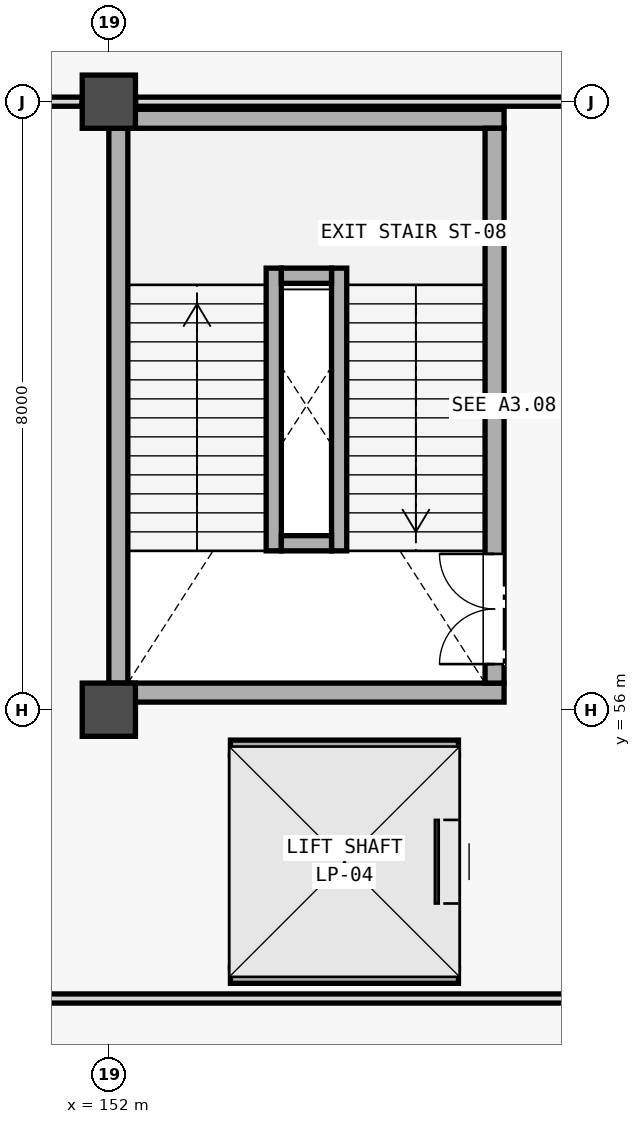
"""IFC4 building model, lengths in metres.
Left out: names, types, materials, properties, quantities, classifications, styles, units other than length and angle.
Written with IfcOpenShell. Run it as: python <this file> out.ifc"""

import sys

from ifc_helpers import new_model, si_unit, direction, frame, frame_2d, origin, origin_2d, place, context, subcontext, project, spatial, rectangle, extrude, element, fill, save


model = new_model("IFC4")
c1 = context("Model", 3, precision=1e-05, world=origin(), true_north=direction((0.0, 1.0)))
c2 = subcontext(c1, "Body", "Model", "MODEL_VIEW")
j1 = project(units=[si_unit("LENGTHUNIT", "METRE"), si_unit("PLANEANGLEUNIT", "RADIAN")], contexts=[c1])
p1 = place(None, origin())
s1 = spatial("IfcSite", under=j1, at=p1, CompositionType="ELEMENT")
p2 = place(p1, origin())
s2 = spatial("IfcBuilding", under=s1, at=p2, CompositionType="ELEMENT")
p3 = place(p2, frame((0.0, 0.0, 5.4)))
s3 = spatial("IfcBuildingStorey", under=s2, at=p3, CompositionType="ELEMENT", Elevation=5.4)
for number, where, z_axis, x_axis in (
    (1, (152.0, 56.0, 0.0), (0.0, 0.0, 1.0), (1.0, 0.0, 0.0)),
    (2, (152.0, 64.0, 0.0), (0.0, 0.0, 1.0), (1.0, 0.0, 0.0)),
):
    element("IfcColumn", number, at=place(p3, frame(where, z_axis=z_axis, x_axis=x_axis)), inside=s3, PredefinedType="COLUMN", context=c2, shape_type="SweptSolid", body=[
        extrude(rectangle(XDim=0.7, YDim=0.7, at=origin_2d()), origin(), (0.0, 0.0, 1.0), 4.55),
    ])
for number, where, z_axis, x_axis in (
    (3, (152.0, 56.225, 0.0), (0.0, 0.0, 1.0), (1.0, 0.0, 0.0)),
    (4, (152.0, 63.775, 0.0), (0.0, 0.0, 1.0), (1.0, 0.0, 0.0)),
):
    element("IfcWall", number, at=place(p3, frame(where, z_axis=z_axis, x_axis=x_axis)), inside=s3, PredefinedType="SHEAR", context=c2, shape_type="SweptSolid", body=[
        extrude(rectangle(XDim=5.2, YDim=0.25, at=frame_2d((2.6, 0.0))), origin(), (0.0, 0.0, 1.0), 4.8),
    ])
p4 = place(p3, frame((152.125, 56.35, 0.0), z_axis=(0.0, 0.0, 1.0), x_axis=(0.0, 1.0, 0.0)))
e5 = element("IfcWall", 5, at=p4, inside=s3, PredefinedType="SHEAR", context=c2, shape_type="SweptSolid", body=[
    extrude(rectangle(XDim=7.3, YDim=0.25, at=frame_2d((3.65, 0.0))), origin(), (0.0, 0.0, 1.0), 4.8),
])
p5 = place(p3, frame((157.075, 56.35, 0.0), z_axis=(0.0, 0.0, 1.0), x_axis=(0.0, 1.0, 0.0)))
e6 = element("IfcWall", 6, at=p5, inside=s3, PredefinedType="SHEAR", context=c2, shape_type="SweptSolid", body=[
    extrude(rectangle(XDim=7.3, YDim=0.25, at=frame_2d((3.65, 0.0))), origin(), (0.0, 0.0, 1.0), 4.8),
])
p6 = place(p5, frame((0.25, 0.0, 0.0)))
e7 = element("IfcOpeningElement", 7, at=p6, cuts=e6, PredefinedType="OPENING", context=c2, shape_type="SweptSolid", body=[
    extrude(rectangle(XDim=1.45, YDim=2.2, at=frame_2d((0.725, 1.1))), frame((0.0, 0.135, 0.0), z_axis=(0.0, -1.0, 0.0), x_axis=(1.0, 0.0, 0.0)), (0.0, 0.0, 1.0), 0.27),
])
for number, where, z_axis, x_axis in (
    (8, (154.17, 58.09, 0.0), (0.0, 0.0, 1.0), (0.0, 1.0, 0.0)),
    (9, (155.03, 58.09, 0.0), (0.0, 0.0, 1.0), (0.0, 1.0, 0.0)),
):
    element("IfcWall", number, at=place(p3, frame(where, z_axis=z_axis, x_axis=x_axis)), inside=s3, PredefinedType="SHEAR", context=c2, shape_type="SweptSolid", body=[
        extrude(rectangle(XDim=3.72, YDim=0.2, at=frame_2d((1.86, 0.0))), origin(), (0.0, 0.0, 1.0), 4.8),
    ])
for number, where, z_axis, x_axis in (
    (10, (154.27, 58.19, 0.0), (0.0, 0.0, 1.0), (1.0, 0.0, 0.0)),
    (11, (154.27, 61.71, 0.0), (0.0, 0.0, 1.0), (1.0, 0.0, 0.0)),
):
    element("IfcWall", number, at=place(p3, frame(where, z_axis=z_axis, x_axis=x_axis)), inside=s3, PredefinedType="SHEAR", context=c2, shape_type="SweptSolid", body=[
        extrude(rectangle(XDim=0.66, YDim=0.2, at=frame_2d((0.33, 0.0))), origin(), (0.0, 0.0, 1.0), 4.8),
    ])
for number, where, z_axis, x_axis in (
    (12, (153.6, 52.5, 0.0), (0.0, 0.0, 1.0), (1.0, 0.0, 0.0)),
    (13, (153.6, 55.5, 0.0), (0.0, 0.0, 1.0), (1.0, 0.0, 0.0)),
):
    element("IfcWall", number, at=place(p3, frame(where, z_axis=z_axis, x_axis=x_axis)), inside=s3, PredefinedType="SHEAR", context=c2, shape_type="SweptSolid", body=[
        extrude(rectangle(XDim=3.0, YDim=0.2, at=frame_2d((1.5, 0.0))), origin(), (0.0, 0.0, 1.0), 4.8),
    ])
p7 = place(p3, frame((153.7, 52.6, 0.0), z_axis=(0.0, 0.0, 1.0), x_axis=(0.0, 1.0, 0.0)))
e14 = element("IfcWall", 14, at=p7, inside=s3, PredefinedType="SHEAR", context=c2, shape_type="SweptSolid", body=[
    extrude(rectangle(XDim=2.8, YDim=0.2, at=frame_2d((1.4, 0.0))), origin(), (0.0, 0.0, 1.0), 4.8),
])
p8 = place(p3, frame((156.5, 52.6, 0.0), z_axis=(0.0, 0.0, 1.0), x_axis=(0.0, 1.0, 0.0)))
e15 = element("IfcWall", 15, at=p8, inside=s3, PredefinedType="SHEAR", context=c2, shape_type="SweptSolid", body=[
    extrude(rectangle(XDim=2.8, YDim=0.2, at=frame_2d((1.4, 0.0))), origin(), (0.0, 0.0, 1.0), 4.8),
])
p9 = place(p8, frame((0.85, 0.0, 0.0)))
e16 = element("IfcOpeningElement", 16, at=p9, cuts=e15, PredefinedType="OPENING", context=c2, shape_type="SweptSolid", body=[
    extrude(rectangle(XDim=1.1, YDim=2.2, at=frame_2d((0.55, 1.1))), frame((0.0, 0.11, 0.0), z_axis=(0.0, -1.0, 0.0), x_axis=(1.0, 0.0, 0.0)), (0.0, 0.0, 1.0), 0.22),
])
p10 = place(p3, frame((144.15, 52.2, 0.0), z_axis=(0.0, 0.0, 1.0), x_axis=(1.0, 0.0, 0.0)))
e17 = element("IfcWall", 17, at=p10, inside=s3, PredefinedType="PARTITIONING", context=c2, shape_type="SweptSolid", body=[
    extrude(rectangle(XDim=17.85, YDim=0.12, at=frame_2d((8.925, 0.0))), origin(), (0.0, 0.0, 1.0), 3.83),
])
p11 = place(p3, frame((144.277, 64.0, 0.0), z_axis=(0.0, 0.0, 1.0), x_axis=(1.0, 0.0, 0.0)))
e18 = element("IfcWall", 18, at=p11, inside=s3, PredefinedType="PARTITIONING", context=c2, shape_type="SweptSolid", body=[
    extrude(rectangle(XDim=7.371, YDim=0.12, at=frame_2d((3.686, 0.0))), origin(), (0.0, 0.0, 1.0), 3.78),
])
p12 = place(p3, frame((152.352, 64.0, 0.0), z_axis=(0.0, 0.0, 1.0), x_axis=(1.0, 0.0, 0.0)))
e19 = element("IfcWall", 19, at=p12, inside=s3, PredefinedType="PARTITIONING", context=c2, shape_type="SweptSolid", body=[
    extrude(rectangle(XDim=9.296, YDim=0.12, at=frame_2d((4.648, 0.0))), origin(), (0.0, 0.0, 1.0), 3.68),
])
p13 = place(p6, origin())
e20 = element("IfcDoor", 20, at=p13, inside=s3, OperationType="DOUBLE_DOOR_SINGLE_SWING", PredefinedType="DOOR", context=c2, shape_type="SweptSolid", body=[
    extrude(rectangle(XDim=1.45, YDim=2.2, at=frame_2d((0.725, 1.1))), frame((0.0, 0.025, 0.0), z_axis=(0.0, -1.0, 0.0), x_axis=(1.0, 0.0, 0.0)), (0.0, 0.0, 1.0), 0.05),
])
fill(e7, e20)
p14 = place(p9, origin())
e21 = element("IfcDoor", 21, at=p14, inside=s3, OperationType="SLIDING_TO_LEFT", PredefinedType="DOOR", context=c2, shape_type="SweptSolid", body=[
    extrude(rectangle(XDim=1.1, YDim=2.2, at=frame_2d((0.55, 1.1))), frame((0.0, 0.025, 0.0), z_axis=(0.0, -1.0, 0.0), x_axis=(1.0, 0.0, 0.0)), (0.0, 0.0, 1.0), 0.05),
])
fill(e16, e21)
save(model, sys.argv[1])
